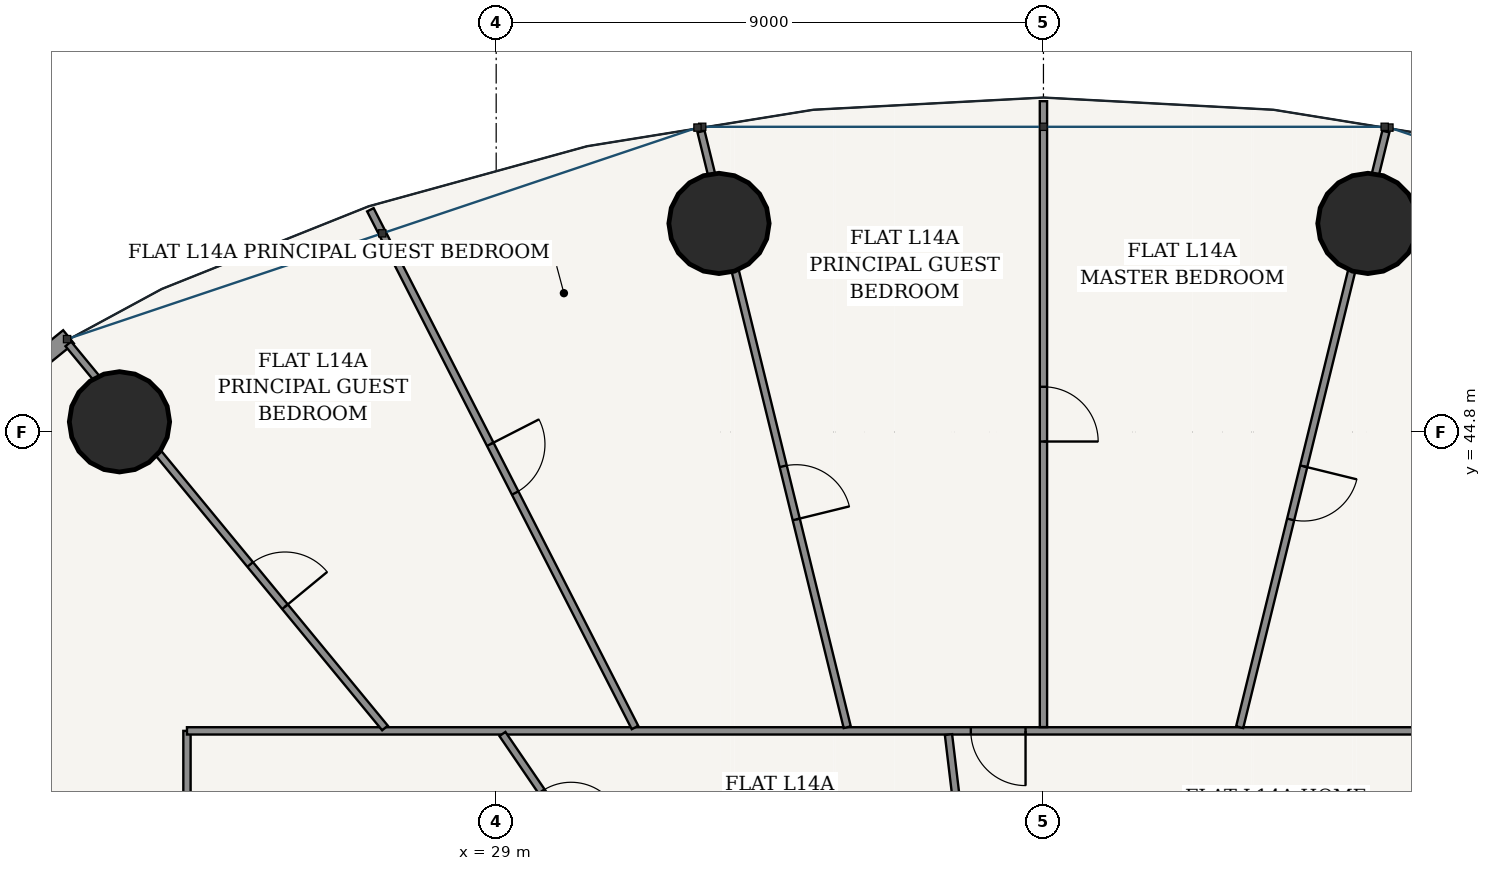
"""IFC4 building model, lengths in metres.
Left out: names, types, materials, properties, quantities, classifications, styles, units other than length and angle.
Written with IfcOpenShell. Run it as: python <this file> out.ifc"""

import sys

from ifc_helpers import new_model, si_unit, direction, frame, frame_2d, origin, origin_2d, place, context, subcontext, project, spatial, rectangle, hollow_circle, extrude, source, transform, mapped, element, fill, save


model = new_model("IFC4")
c1 = context("Model", 3, precision=1e-05, world=origin(), true_north=direction((-0.2419218956, 0.970295726276)))
c2 = subcontext(c1, "Body", "Model", "MODEL_VIEW")
j1 = project(units=[si_unit("LENGTHUNIT", "METRE"), si_unit("PLANEANGLEUNIT", "RADIAN")], contexts=[c1])
p1 = place(None, origin())
s1 = spatial("IfcSite", under=j1, at=p1, CompositionType="ELEMENT")
p2 = place(p1, origin())
s2 = spatial("IfcBuilding", under=s1, at=p2, CompositionType="ELEMENT")
p3 = place(p2, frame((0.0, 0.0, 56.4)))
s3 = spatial("IfcBuildingStorey", under=s2, at=p3, CompositionType="ELEMENT", Elevation=56.4)
for number, where, z_axis, x_axis in (
    (1, (43.336, 48.23, 0.0), (0.0, 0.0, 1.0), (1.0, 0.0, 0.0)),
    (2, (32.664, 48.23, 0.0), (0.0, 0.0, 1.0), (1.0, 0.0, 0.0)),
    (3, (22.805, 44.968, 0.0), (0.0, 0.0, 1.0), (1.0, 0.0, 0.0)),
):
    element("IfcColumn", number, at=place(p3, frame(where, z_axis=z_axis, x_axis=x_axis)), inside=s3, PredefinedType="COLUMN", context=c2, shape_type="SweptSolid", body=[
        extrude(hollow_circle(Radius=0.825, WallThickness=0.05, at=origin_2d()), origin(), (0.0, 0.0, 1.0), 3.6),
    ])
p4 = place(p3, frame((21.967, 46.365, 0.0), z_axis=(0.0, 0.0, 1.0), x_axis=(-0.777005352078, -0.62949398952, 0.0)))
e4 = element("IfcWall", 4, at=p4, inside=s3, PredefinedType="SOLIDWALL", context=c2, shape_type="SweptSolid", body=[
    extrude(rectangle(XDim=10.447, YDim=0.28, at=frame_2d((5.223, 0.0))), origin(), (0.0, 0.0, 1.0), 3.32),
])
p5 = place(p4, frame((1.771, 0.0, 0.85)))
e5 = element("IfcOpeningElement", 5, at=p5, cuts=e4, PredefinedType="OPENING", context=c2, shape_type="SweptSolid", body=[
    extrude(rectangle(XDim=2.1, YDim=1.95, at=frame_2d((1.05, 0.975))), frame((0.0, 0.15, 0.0), z_axis=(0.0, -1.0, 0.0), x_axis=(1.0, 0.0, 0.0)), (0.0, 0.0, 1.0), 0.3),
])
p6 = place(p4, frame((6.576, 0.0, 0.85)))
e6 = element("IfcOpeningElement", 6, at=p6, cuts=e4, PredefinedType="OPENING", context=c2, shape_type="SweptSolid", body=[
    extrude(rectangle(XDim=2.1, YDim=1.95, at=frame_2d((1.05, 0.975))), frame((0.0, 0.15, 0.0), z_axis=(0.0, -1.0, 0.0), x_axis=(1.0, 0.0, 0.0)), (0.0, 0.0, 1.0), 0.3),
])
p7 = place(p3, frame((23.915, 19.276, 0.0), z_axis=(0.0, 0.0, 1.0), x_axis=(0.0, 1.0, 0.0)))
e7 = element("IfcWall", 7, at=p7, inside=s3, PredefinedType="PARTITIONING", context=c2, shape_type="SweptSolid", body=[
    extrude(rectangle(XDim=20.609, YDim=0.12, at=frame_2d((10.305, 0.0))), origin(), (0.0, 0.0, 1.0), 2.688),
])
p8 = place(p7, frame((15.972, 0.0, 0.0)))
e8 = element("IfcOpeningElement", 8, at=p8, cuts=e7, PredefinedType="OPENING", context=c2, shape_type="SweptSolid", body=[
    extrude(rectangle(XDim=0.9, YDim=2.15, at=frame_2d((0.45, 1.075))), frame((0.0, 0.07, 0.0), z_axis=(0.0, -1.0, 0.0), x_axis=(1.0, 0.0, 0.0)), (0.0, 0.0, 1.0), 0.14),
])
p9 = place(p7, frame((3.058, 0.0, 0.0)))
e9 = element("IfcOpeningElement", 9, at=p9, cuts=e7, PredefinedType="OPENING", context=c2, shape_type="SweptSolid", body=[
    extrude(rectangle(XDim=0.9, YDim=2.15, at=frame_2d((0.45, 1.075))), frame((0.0, 0.07, 0.0), z_axis=(0.0, -1.0, 0.0), x_axis=(1.0, 0.0, 0.0)), (0.0, 0.0, 1.0), 0.14),
])
p10 = place(p3, frame((23.915, 39.885, 0.0), z_axis=(0.0, 0.0, 1.0), x_axis=(1.0, 0.0, 0.0)))
e10 = element("IfcWall", 10, at=p10, inside=s3, PredefinedType="PARTITIONING", context=c2, shape_type="SweptSolid", body=[
    extrude(rectangle(XDim=28.17, YDim=0.12, at=frame_2d((14.085, 0.0))), origin(), (0.0, 0.0, 1.0), 2.688),
])
p11 = place(p10, frame((12.891, 0.0, 0.0)))
e11 = element("IfcOpeningElement", 11, at=p11, cuts=e10, PredefinedType="OPENING", context=c2, shape_type="SweptSolid", body=[
    extrude(rectangle(XDim=0.9, YDim=2.15, at=frame_2d((0.45, 1.075))), frame((0.0, 0.07, 0.0), z_axis=(0.0, -1.0, 0.0), x_axis=(1.0, 0.0, 0.0)), (0.0, 0.0, 1.0), 0.14),
])
p12 = place(p3, frame((41.227, 39.945, 0.0), z_axis=(0.0, 0.0, 1.0), x_axis=(0.238375747469, 0.97117300365, 0.0)))
e12 = element("IfcWall", 12, at=p12, inside=s3, PredefinedType="PARTITIONING", context=c2, shape_type="SweptSolid", body=[
    extrude(rectangle(XDim=10.086, YDim=0.12, at=frame_2d((5.043, 0.0))), origin(), (0.0, 0.0, 1.0), 2.688),
])
p13 = place(p12, frame((3.518, 0.0, 0.0)))
e13 = element("IfcOpeningElement", 13, at=p13, cuts=e12, PredefinedType="OPENING", context=c2, shape_type="SweptSolid", body=[
    extrude(rectangle(XDim=0.9, YDim=2.15, at=frame_2d((0.45, 1.075))), frame((0.0, 0.07, 0.0), z_axis=(0.0, -1.0, 0.0), x_axis=(1.0, 0.0, 0.0)), (0.0, 0.0, 1.0), 0.14),
])
p14 = place(p3, frame((38.0, 39.947, 0.0), z_axis=(0.0, 0.0, 1.0), x_axis=(0.0, 1.0, 0.0)))
e14 = element("IfcWall", 14, at=p14, inside=s3, PredefinedType="PARTITIONING", context=c2, shape_type="SweptSolid", body=[
    extrude(rectangle(XDim=10.293, YDim=0.12, at=frame_2d((5.146, 0.0))), origin(), (0.0, 0.0, 1.0), 2.762),
])
p15 = place(p14, frame((4.697, 0.0, 0.0)))
e15 = element("IfcOpeningElement", 15, at=p15, cuts=e14, PredefinedType="OPENING", context=c2, shape_type="SweptSolid", body=[
    extrude(rectangle(XDim=0.9, YDim=2.15, at=frame_2d((0.45, 1.075))), frame((0.0, 0.07, 0.0), z_axis=(0.0, -1.0, 0.0), x_axis=(1.0, 0.0, 0.0)), (0.0, 0.0, 1.0), 0.14),
])
p16 = place(p3, frame((34.773, 39.945, 0.0), z_axis=(0.0, 0.0, 1.0), x_axis=(-0.238375747469, 0.97117300365, 0.0)))
e16 = element("IfcWall", 16, at=p16, inside=s3, PredefinedType="PARTITIONING", context=c2, shape_type="SweptSolid", body=[
    extrude(rectangle(XDim=10.086, YDim=0.12, at=frame_2d((5.043, 0.0))), origin(), (0.0, 0.0, 1.0), 2.688),
])
p17 = place(p16, frame((3.519, 0.0, 0.0)))
e17 = element("IfcOpeningElement", 17, at=p17, cuts=e16, PredefinedType="OPENING", context=c2, shape_type="SweptSolid", body=[
    extrude(rectangle(XDim=0.9, YDim=2.15, at=frame_2d((0.45, 1.075))), frame((0.0, 0.07, 0.0), z_axis=(0.0, -1.0, 0.0), x_axis=(1.0, 0.0, 0.0)), (0.0, 0.0, 1.0), 0.14),
])
p18 = place(p3, frame((31.283, 39.94, 0.0), z_axis=(0.0, 0.0, 1.0), x_axis=(-0.455131303234, 0.890424335256, 0.0)))
e18 = element("IfcWall", 18, at=p18, inside=s3, PredefinedType="PARTITIONING", context=c2, shape_type="SweptSolid", body=[
    extrude(rectangle(XDim=9.562, YDim=0.12, at=frame_2d((4.781, 0.0))), origin(), (0.0, 0.0, 1.0), 2.762),
])
p19 = place(p18, frame((4.331, 0.0, 0.0)))
e19 = element("IfcOpeningElement", 19, at=p19, cuts=e18, PredefinedType="OPENING", context=c2, shape_type="SweptSolid", body=[
    extrude(rectangle(XDim=0.9, YDim=2.15, at=frame_2d((0.45, 1.075))), frame((0.0, 0.07, 0.0), z_axis=(0.0, -1.0, 0.0), x_axis=(1.0, 0.0, 0.0)), (0.0, 0.0, 1.0), 0.14),
])
p20 = place(p3, frame((27.171, 39.933, 0.0), z_axis=(0.0, 0.0, 1.0), x_axis=(-0.636192172227, 0.771530634516, 0.0)))
e20 = element("IfcWall", 20, at=p20, inside=s3, PredefinedType="PARTITIONING", context=c2, shape_type="SweptSolid", body=[
    extrude(rectangle(XDim=8.186, YDim=0.12, at=frame_2d((4.093, 0.0))), origin(), (0.0, 0.0, 1.0), 2.688),
])
p21 = place(p20, frame((2.584, 0.0, 0.0)))
e21 = element("IfcOpeningElement", 21, at=p21, cuts=e20, PredefinedType="OPENING", context=c2, shape_type="SweptSolid", body=[
    extrude(rectangle(XDim=0.9, YDim=2.15, at=frame_2d((0.45, 1.075))), frame((0.0, 0.07, 0.0), z_axis=(0.0, -1.0, 0.0), x_axis=(1.0, 0.0, 0.0)), (0.0, 0.0, 1.0), 0.14),
])
p22 = place(p3, frame((36.749, 37.237, 0.0), z_axis=(0.0, 0.0, 1.0), x_axis=(-0.119119351225, 0.992879942472, 0.0)))
e22 = element("IfcWall", 22, at=p22, inside=s3, PredefinedType="PARTITIONING", context=c2, shape_type="SweptSolid", body=[
    extrude(rectangle(XDim=2.605, YDim=0.12, at=frame_2d((1.302, 0.0))), origin(), (0.0, 0.0, 1.0), 3.32),
])
p23 = place(p3, frame((30.875, 37.237, 0.0), z_axis=(0.0, 0.0, 1.0), x_axis=(-0.563751131022, 0.825944708967, 0.0)))
e23 = element("IfcWall", 23, at=p23, inside=s3, PredefinedType="PARTITIONING", context=c2, shape_type="SweptSolid", body=[
    extrude(rectangle(XDim=3.145, YDim=0.12, at=frame_2d((1.572, 0.0))), origin(), (0.0, 0.0, 1.0), 3.32),
])
p24 = place(p23, frame((1.142, 0.0, 0.0)))
e24 = element("IfcOpeningElement", 24, at=p24, cuts=e23, PredefinedType="OPENING", context=c2, shape_type="SweptSolid", body=[
    extrude(rectangle(XDim=0.86, YDim=2.15, at=frame_2d((0.43, 1.075))), frame((0.0, 0.07, 0.0), z_axis=(0.0, -1.0, 0.0), x_axis=(1.0, 0.0, 0.0)), (0.0, 0.0, 1.0), 0.14),
])
m1 = source(origin(), c2, "Body", "SweptSolid", [
    extrude(rectangle(XDim=0.86, YDim=2.15, at=frame_2d((0.43, 1.075))), frame((0.0, 0.025, 0.0), z_axis=(0.0, -1.0, 0.0), x_axis=(1.0, 0.0, 0.0)), (0.0, 0.0, 1.0), 0.05),
])
p25 = place(p24, frame((0.86, 0.0, 0.0), z_axis=(0.0, 0.0, 1.0), x_axis=(-1.0, 0.0, 0.0)))
e25 = element("IfcDoor", 25, at=p25, inside=s3, OperationType="SINGLE_SWING_RIGHT", PredefinedType="DOOR", context=c2, shape_type="MappedRepresentation", body=[
    mapped(m1, transform((0.0, 0.0, 0.0), scale=1.0)),
])
fill(e24, e25)
m2 = source(origin(), c2, "Body", "SweptSolid", [
    extrude(rectangle(XDim=0.9, YDim=2.15, at=frame_2d((0.45, 1.075))), frame((0.0, 0.025, 0.0), z_axis=(0.0, -1.0, 0.0), x_axis=(1.0, 0.0, 0.0)), (0.0, 0.0, 1.0), 0.05),
])
p26 = place(p21, frame((0.9, 0.0, 0.0), z_axis=(0.0, 0.0, 1.0), x_axis=(-1.0, 0.0, 0.0)))
e26 = element("IfcDoor", 26, at=p26, inside=s3, OperationType="SINGLE_SWING_RIGHT", PredefinedType="DOOR", context=c2, shape_type="MappedRepresentation", body=[
    mapped(m2, transform((0.0, 0.0, 0.0), scale=1.0)),
])
fill(e21, e26)
p27 = place(p19, frame((0.9, 0.0, 0.0), z_axis=(0.0, 0.0, 1.0), x_axis=(-1.0, 0.0, 0.0)))
e27 = element("IfcDoor", 27, at=p27, inside=s3, OperationType="SINGLE_SWING_LEFT", PredefinedType="DOOR", context=c2, shape_type="MappedRepresentation", body=[
    mapped(m2, transform((0.0, 0.0, 0.0), scale=1.0)),
])
fill(e19, e27)
p28 = place(p17, frame((0.9, 0.0, 0.0), z_axis=(0.0, 0.0, 1.0), x_axis=(-1.0, 0.0, 0.0)))
e28 = element("IfcDoor", 28, at=p28, inside=s3, OperationType="SINGLE_SWING_RIGHT", PredefinedType="DOOR", context=c2, shape_type="MappedRepresentation", body=[
    mapped(m2, transform((0.0, 0.0, 0.0), scale=1.0)),
])
fill(e17, e28)
p29 = place(p11, frame((0.9, 0.0, 0.0), z_axis=(0.0, 0.0, 1.0), x_axis=(-1.0, 0.0, 0.0)))
e29 = element("IfcDoor", 29, at=p29, inside=s3, OperationType="SINGLE_SWING_LEFT", PredefinedType="DOOR", context=c2, shape_type="MappedRepresentation", body=[
    mapped(m2, transform((0.0, 0.0, 0.0), scale=1.0)),
])
fill(e11, e29)
p30 = place(p15, frame((0.9, 0.0, 0.0), z_axis=(0.0, 0.0, 1.0), x_axis=(-1.0, 0.0, 0.0)))
e30 = element("IfcDoor", 30, at=p30, inside=s3, OperationType="SINGLE_SWING_RIGHT", PredefinedType="DOOR", context=c2, shape_type="MappedRepresentation", body=[
    mapped(m2, transform((0.0, 0.0, 0.0), scale=1.0)),
])
fill(e15, e30)
p31 = place(p13, frame((0.9, 0.0, 0.0), z_axis=(0.0, 0.0, 1.0), x_axis=(-1.0, 0.0, 0.0)))
e31 = element("IfcDoor", 31, at=p31, inside=s3, OperationType="SINGLE_SWING_LEFT", PredefinedType="DOOR", context=c2, shape_type="MappedRepresentation", body=[
    mapped(m2, transform((0.0, 0.0, 0.0), scale=1.0)),
])
fill(e13, e31)
save(model, sys.argv[1])
